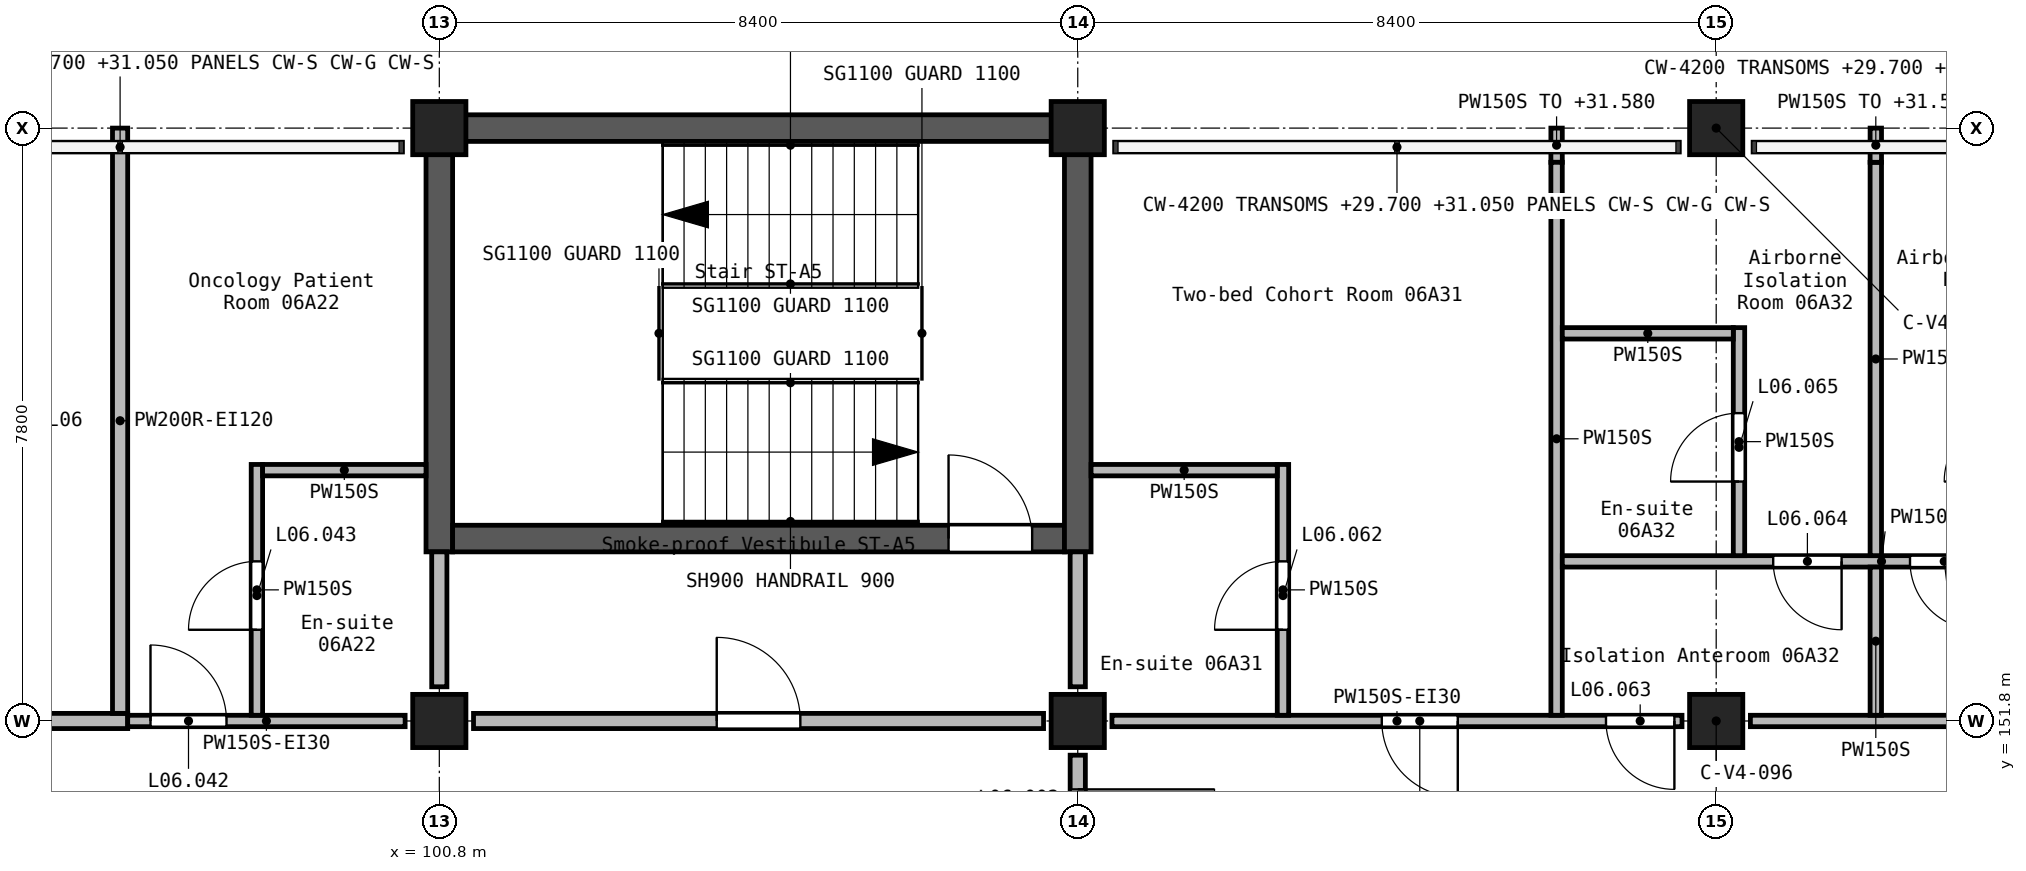
"""IFC4 building model, lengths in metres.
Left out: names, types, materials, properties, quantities, classifications, styles, units other than length and angle.
Written with IfcOpenShell. Run it as: python <this file> out.ifc"""

import sys

from ifc_helpers import new_model, si_unit, direction, frame, frame_2d, origin, origin_2d, place, context, subcontext, project, spatial, rectangle, extrude, element, fill, save


model = new_model("IFC4")
c1 = context("Model", 3, precision=1e-05, world=origin(), true_north=direction((0.0, 1.0)))
c2 = subcontext(c1, "Body", "Model", "MODEL_VIEW")
j1 = project(units=[si_unit("LENGTHUNIT", "METRE"), si_unit("PLANEANGLEUNIT", "RADIAN")], contexts=[c1])
p1 = place(None, origin())
s1 = spatial("IfcSite", under=j1, at=p1, CompositionType="ELEMENT")
p2 = place(p1, origin())
s2 = spatial("IfcBuilding", under=s1, at=p2, CompositionType="ELEMENT")
p3 = place(p2, frame((0.0, 0.0, 28.8)))
s3 = spatial("IfcBuildingStorey", under=s2, at=p3, CompositionType="ELEMENT", Elevation=28.8)
for number, where, z_axis, x_axis in (
    (1, (100.8, 151.8, 0.0), (0.0, 0.0, 1.0), (1.0, 0.0, 0.0)),
    (2, (100.8, 159.6, 0.0), (0.0, 0.0, 1.0), (1.0, 0.0, 0.0)),
    (3, (109.2, 151.8, 0.0), (0.0, 0.0, 1.0), (1.0, 0.0, 0.0)),
    (4, (109.2, 159.6, 0.0), (0.0, 0.0, 1.0), (1.0, 0.0, 0.0)),
    (5, (117.6, 151.8, 0.0), (0.0, 0.0, 1.0), (1.0, 0.0, 0.0)),
    (6, (117.6, 159.6, 0.0), (0.0, 0.0, 1.0), (1.0, 0.0, 0.0)),
):
    element("IfcColumn", number, at=place(p3, frame(where, z_axis=z_axis, x_axis=x_axis)), inside=s3, PredefinedType="COLUMN", context=c2, shape_type="SweptSolid", body=[
        extrude(rectangle(XDim=0.7, YDim=0.7, at=origin_2d()), origin(), (0.0, 0.0, 1.0), 3.9),
    ])
p4 = place(p3, frame((100.625, 159.6, 0.0), z_axis=(0.0, 0.0, 1.0), x_axis=(1.0, 0.0, 0.0)))
e7 = element("IfcWall", 7, at=p4, inside=s3, PredefinedType="SHEAR", context=c2, shape_type="SweptSolid", body=[
    extrude(rectangle(XDim=8.4, YDim=0.35, at=frame_2d((4.2, 0.0))), origin(), (0.0, 0.0, 1.0), 3.9),
])
p5 = place(p3, frame((100.8, 154.025, 0.0), z_axis=(0.0, 0.0, 1.0), x_axis=(0.0, 1.0, 0.0)))
e8 = element("IfcWall", 8, at=p5, inside=s3, PredefinedType="SHEAR", context=c2, shape_type="SweptSolid", body=[
    extrude(rectangle(XDim=5.4, YDim=0.35, at=frame_2d((2.7, 0.0))), origin(), (0.0, 0.0, 1.0), 3.9),
])
p6 = place(p3, frame((100.975, 154.2, 0.0), z_axis=(0.0, 0.0, 1.0), x_axis=(1.0, 0.0, 0.0)))
e9 = element("IfcWall", 9, at=p6, inside=s3, PredefinedType="SHEAR", context=c2, shape_type="SweptSolid", body=[
    extrude(rectangle(XDim=8.05, YDim=0.35, at=frame_2d((4.025, 0.0))), origin(), (0.0, 0.0, 1.0), 3.9),
])
p7 = place(p6, frame((6.525, 0.0, 0.0)))
e10 = element("IfcOpeningElement", 10, at=p7, cuts=e9, PredefinedType="OPENING", context=c2, shape_type="SweptSolid", body=[
    extrude(rectangle(XDim=1.1, YDim=2.1, at=frame_2d((0.55, 1.05))), frame((0.0, 0.185, 0.0), z_axis=(0.0, -1.0, 0.0), x_axis=(1.0, 0.0, 0.0)), (0.0, 0.0, 1.0), 0.37),
])
p8 = place(p3, frame((109.2, 154.025, 0.0), z_axis=(0.0, 0.0, 1.0), x_axis=(0.0, 1.0, 0.0)))
e11 = element("IfcWall", 11, at=p8, inside=s3, PredefinedType="SHEAR", context=c2, shape_type="SweptSolid", body=[
    extrude(rectangle(XDim=5.75, YDim=0.35, at=frame_2d((2.875, 0.0))), origin(), (0.0, 0.0, 1.0), 3.9),
])
p9 = place(p3, frame((109.2, 154.025, 0.0), z_axis=(0.0, 0.0, 1.0), x_axis=(0.0, -1.0, 0.0)))
e12 = element("IfcWall", 12, at=p9, inside=s3, PredefinedType="SOLIDWALL", context=c2, shape_type="SweptSolid", body=[
    extrude(rectangle(XDim=1.775, YDim=0.2, at=frame_2d((0.887, 0.0))), origin(), (0.0, 0.0, 1.0), 3.6),
])
p10 = place(p3, frame((109.2, 151.35, 0.0), z_axis=(0.0, 0.0, 1.0), x_axis=(0.0, -1.0, 0.0)))
e13 = element("IfcWall", 13, at=p10, inside=s3, PredefinedType="SOLIDWALL", context=c2, shape_type="SweptSolid", body=[
    extrude(rectangle(XDim=2.7, YDim=0.2, at=frame_2d((1.35, 0.0))), origin(), (0.0, 0.0, 1.0), 3.6),
])
p11 = place(p10, frame((0.45, 0.0, 0.0)))
e14 = element("IfcOpeningElement", 14, at=p11, cuts=e13, PredefinedType="OPENING", context=c2, shape_type="SweptSolid", body=[
    extrude(rectangle(XDim=1.8, YDim=2.1, at=frame_2d((0.9, 1.05))), frame((0.0, 0.11, 0.0), z_axis=(0.0, -1.0, 0.0), x_axis=(1.0, 0.0, 0.0)), (0.0, 0.0, 1.0), 0.22),
])
p12 = place(p3, frame((92.85, 151.8, 0.0), z_axis=(0.0, 0.0, 1.0), x_axis=(1.0, 0.0, 0.0)))
e15 = element("IfcWall", 15, at=p12, inside=s3, PredefinedType="SOLIDWALL", context=c2, shape_type="SweptSolid", body=[
    extrude(rectangle(XDim=3.85, YDim=0.2, at=frame_2d((1.925, 0.0))), origin(), (0.0, 0.0, 1.0), 3.6),
])
p13 = place(p12, frame((1.15, 0.0, 0.0)))
e16 = element("IfcOpeningElement", 16, at=p13, cuts=e15, PredefinedType="OPENING", context=c2, shape_type="SweptSolid", body=[
    extrude(rectangle(XDim=1.0, YDim=2.1, at=frame_2d((0.5, 1.05))), frame((0.0, 0.11, 0.0), z_axis=(0.0, -1.0, 0.0), x_axis=(1.0, 0.0, 0.0)), (0.0, 0.0, 1.0), 0.22),
])
p14 = place(p3, frame((101.25, 151.8, 0.0), z_axis=(0.0, 0.0, 1.0), x_axis=(1.0, 0.0, 0.0)))
e17 = element("IfcWall", 17, at=p14, inside=s3, PredefinedType="SOLIDWALL", context=c2, shape_type="SweptSolid", body=[
    extrude(rectangle(XDim=7.5, YDim=0.2, at=frame_2d((3.75, 0.0))), origin(), (0.0, 0.0, 1.0), 3.6),
])
p15 = place(p14, frame((3.2, 0.0, 0.0)))
e18 = element("IfcOpeningElement", 18, at=p15, cuts=e17, PredefinedType="OPENING", context=c2, shape_type="SweptSolid", body=[
    extrude(rectangle(XDim=1.1, YDim=2.1, at=frame_2d((0.55, 1.05))), frame((0.0, 0.11, 0.0), z_axis=(0.0, -1.0, 0.0), x_axis=(1.0, 0.0, 0.0)), (0.0, 0.0, 1.0), 0.22),
])
p16 = place(p3, frame((96.6, 151.9, 0.0), z_axis=(0.0, 0.0, 1.0), x_axis=(0.0, 1.0, 0.0)))
e19 = element("IfcWall", 19, at=p16, inside=s3, PredefinedType="SOLIDWALL", context=c2, shape_type="SweptSolid", body=[
    extrude(rectangle(XDim=7.7, YDim=0.2, at=frame_2d((3.85, 0.0))), origin(), (0.0, 0.0, 1.0), 3.6),
])
p17 = place(p3, frame((100.8, 152.25, 0.0), z_axis=(0.0, 0.0, 1.0), x_axis=(0.0, 1.0, 0.0)))
e20 = element("IfcWall", 20, at=p17, inside=s3, PredefinedType="SOLIDWALL", context=c2, shape_type="SweptSolid", body=[
    extrude(rectangle(XDim=1.775, YDim=0.2, at=frame_2d((0.887, 0.0))), origin(), (0.0, 0.0, 1.0), 3.6),
])
p18 = place(p3, frame((125.55, 151.8, 0.0), z_axis=(0.0, 0.0, 1.0), x_axis=(-1.0, 0.0, 0.0)))
e21 = element("IfcWall", 21, at=p18, inside=s3, PredefinedType="PARTITIONING", context=c2, shape_type="SweptSolid", body=[
    extrude(rectangle(XDim=7.5, YDim=0.15, at=frame_2d((3.75, 0.0))), origin(), (0.0, 0.0, 1.0), 3.6),
])
p19 = place(p18, frame((3.3, 0.0, 0.0)))
e22 = element("IfcOpeningElement", 22, at=p19, cuts=e21, PredefinedType="OPENING", context=c2, shape_type="SweptSolid", body=[
    extrude(rectangle(XDim=0.9, YDim=2.1, at=frame_2d((0.45, 1.05))), frame((0.0, 0.085, 0.0), z_axis=(0.0, -1.0, 0.0), x_axis=(1.0, 0.0, 0.0)), (0.0, 0.0, 1.0), 0.17),
])
p20 = place(p3, frame((117.15, 151.8, 0.0), z_axis=(0.0, 0.0, 1.0), x_axis=(-1.0, 0.0, 0.0)))
e23 = element("IfcWall", 23, at=p20, inside=s3, PredefinedType="PARTITIONING", context=c2, shape_type="SweptSolid", body=[
    extrude(rectangle(XDim=7.5, YDim=0.15, at=frame_2d((3.75, 0.0))), origin(), (0.0, 0.0, 1.0), 3.6),
])
p21 = place(p20, frame((2.95, 0.0, 0.0)))
e24 = element("IfcOpeningElement", 24, at=p21, cuts=e23, PredefinedType="OPENING", context=c2, shape_type="SweptSolid", body=[
    extrude(rectangle(XDim=1.0, YDim=2.1, at=frame_2d((0.5, 1.05))), frame((0.0, 0.085, 0.0), z_axis=(0.0, -1.0, 0.0), x_axis=(1.0, 0.0, 0.0)), (0.0, 0.0, 1.0), 0.17),
])
p22 = place(p20, frame((0.1, 0.0, 0.0)))
e25 = element("IfcOpeningElement", 25, at=p22, cuts=e23, PredefinedType="OPENING", context=c2, shape_type="SweptSolid", body=[
    extrude(rectangle(XDim=0.9, YDim=2.1, at=frame_2d((0.45, 1.05))), frame((0.0, 0.085, 0.0), z_axis=(0.0, -1.0, 0.0), x_axis=(1.0, 0.0, 0.0)), (0.0, 0.0, 1.0), 0.17),
])
p23 = place(p3, frame((96.7, 151.8, 0.0), z_axis=(0.0, 0.0, 1.0), x_axis=(1.0, 0.0, 0.0)))
e26 = element("IfcWall", 26, at=p23, inside=s3, PredefinedType="PARTITIONING", context=c2, shape_type="SweptSolid", body=[
    extrude(rectangle(XDim=3.65, YDim=0.15, at=frame_2d((1.825, 0.0))), origin(), (0.0, 0.0, 1.0), 3.6),
])
p24 = place(p23, frame((0.3, 0.0, 0.0)))
e27 = element("IfcOpeningElement", 27, at=p24, cuts=e26, PredefinedType="OPENING", context=c2, shape_type="SweptSolid", body=[
    extrude(rectangle(XDim=1.0, YDim=2.1, at=frame_2d((0.5, 1.05))), frame((0.0, 0.085, 0.0), z_axis=(0.0, -1.0, 0.0), x_axis=(1.0, 0.0, 0.0)), (0.0, 0.0, 1.0), 0.17),
])
p25 = place(p3, frame((115.5, 159.6, 0.0), z_axis=(0.0, 0.0, 1.0), x_axis=(0.0, -1.0, 0.0)))
e28 = element("IfcWall", 28, at=p25, inside=s3, PredefinedType="PARTITIONING", context=c2, shape_type="SweptSolid", body=[
    extrude(rectangle(XDim=0.45, YDim=0.15, at=frame_2d((0.225, 0.0))), origin(), (0.0, 0.0, 1.0), 2.78),
])
p26 = place(p3, frame((115.5, 159.15, 0.0), z_axis=(0.0, 0.0, 1.0), x_axis=(0.0, -1.0, 0.0)))
e29 = element("IfcWall", 29, at=p26, inside=s3, PredefinedType="PARTITIONING", context=c2, shape_type="SweptSolid", body=[
    extrude(rectangle(XDim=7.275, YDim=0.15, at=frame_2d((3.637, 0.0))), origin(), (0.0, 0.0, 1.0), 3.6),
])
p27 = place(p3, frame((123.975, 153.9, 0.0), z_axis=(0.0, 0.0, 1.0), x_axis=(-1.0, 0.0, 0.0)))
e30 = element("IfcWall", 30, at=p27, inside=s3, PredefinedType="PARTITIONING", context=c2, shape_type="SweptSolid", body=[
    extrude(rectangle(XDim=8.4, YDim=0.15, at=frame_2d((4.2, 0.0))), origin(), (0.0, 0.0, 1.0), 3.6),
])
p28 = place(p27, frame((4.725, 0.0, 0.0)))
e31 = element("IfcOpeningElement", 31, at=p28, cuts=e30, PredefinedType="OPENING", context=c2, shape_type="SweptSolid", body=[
    extrude(rectangle(XDim=0.9, YDim=2.1, at=frame_2d((0.45, 1.05))), frame((0.0, 0.085, 0.0), z_axis=(0.0, -1.0, 0.0), x_axis=(1.0, 0.0, 0.0)), (0.0, 0.0, 1.0), 0.17),
])
p29 = place(p27, frame((2.925, 0.0, 0.0)))
e32 = element("IfcOpeningElement", 32, at=p29, cuts=e30, PredefinedType="OPENING", context=c2, shape_type="SweptSolid", body=[
    extrude(rectangle(XDim=0.9, YDim=2.1, at=frame_2d((0.45, 1.05))), frame((0.0, 0.085, 0.0), z_axis=(0.0, -1.0, 0.0), x_axis=(1.0, 0.0, 0.0)), (0.0, 0.0, 1.0), 0.17),
])
p30 = place(p3, frame((119.7, 151.875, 0.0), z_axis=(0.0, 0.0, 1.0), x_axis=(0.0, 1.0, 0.0)))
e33 = element("IfcWall", 33, at=p30, inside=s3, PredefinedType="PARTITIONING", context=c2, shape_type="SweptSolid", body=[
    extrude(rectangle(XDim=1.95, YDim=0.15, at=frame_2d((0.975, 0.0))), origin(), (0.0, 0.0, 1.0), 3.6),
])
p31 = place(p3, frame((119.7, 153.975, 0.0), z_axis=(0.0, 0.0, 1.0), x_axis=(0.0, 1.0, 0.0)))
e34 = element("IfcWall", 34, at=p31, inside=s3, PredefinedType="PARTITIONING", context=c2, shape_type="SweptSolid", body=[
    extrude(rectangle(XDim=5.175, YDim=0.15, at=frame_2d((2.587, 0.0))), origin(), (0.0, 0.0, 1.0), 3.6),
])
p32 = place(p3, frame((119.7, 159.15, 0.0), z_axis=(0.0, 0.0, 1.0), x_axis=(0.0, 1.0, 0.0)))
e35 = element("IfcWall", 35, at=p32, inside=s3, PredefinedType="PARTITIONING", context=c2, shape_type="SweptSolid", body=[
    extrude(rectangle(XDim=0.45, YDim=0.15, at=frame_2d((0.225, 0.0))), origin(), (0.0, 0.0, 1.0), 2.78),
])
p33 = place(p3, frame((98.4, 151.875, 0.0), z_axis=(0.0, 0.0, 1.0), x_axis=(0.0, 1.0, 0.0)))
e36 = element("IfcWall", 36, at=p33, inside=s3, PredefinedType="PARTITIONING", context=c2, shape_type="SweptSolid", body=[
    extrude(rectangle(XDim=3.3, YDim=0.15, at=frame_2d((1.65, 0.0))), origin(), (0.0, 0.0, 1.0), 3.6),
])
p34 = place(p33, frame((1.125, 0.0, 0.0)))
e37 = element("IfcOpeningElement", 37, at=p34, cuts=e36, PredefinedType="OPENING", context=c2, shape_type="SweptSolid", body=[
    extrude(rectangle(XDim=0.9, YDim=2.1, at=frame_2d((0.45, 1.05))), frame((0.0, 0.085, 0.0), z_axis=(0.0, -1.0, 0.0), x_axis=(1.0, 0.0, 0.0)), (0.0, 0.0, 1.0), 0.17),
])
p35 = place(p3, frame((111.9, 151.875, 0.0), z_axis=(0.0, 0.0, 1.0), x_axis=(0.0, 1.0, 0.0)))
e38 = element("IfcWall", 38, at=p35, inside=s3, PredefinedType="PARTITIONING", context=c2, shape_type="SweptSolid", body=[
    extrude(rectangle(XDim=3.3, YDim=0.15, at=frame_2d((1.65, 0.0))), origin(), (0.0, 0.0, 1.0), 3.6),
])
p36 = place(p35, frame((1.125, 0.0, 0.0)))
e39 = element("IfcOpeningElement", 39, at=p36, cuts=e38, PredefinedType="OPENING", context=c2, shape_type="SweptSolid", body=[
    extrude(rectangle(XDim=0.9, YDim=2.1, at=frame_2d((0.45, 1.05))), frame((0.0, 0.085, 0.0), z_axis=(0.0, -1.0, 0.0), x_axis=(1.0, 0.0, 0.0)), (0.0, 0.0, 1.0), 0.17),
])
p37 = place(p3, frame((117.9, 153.975, 0.0), z_axis=(0.0, 0.0, 1.0), x_axis=(0.0, 1.0, 0.0)))
e40 = element("IfcWall", 40, at=p37, inside=s3, PredefinedType="PARTITIONING", context=c2, shape_type="SweptSolid", body=[
    extrude(rectangle(XDim=3.0, YDim=0.15, at=frame_2d((1.5, 0.0))), origin(), (0.0, 0.0, 1.0), 3.6),
])
p38 = place(p37, frame((0.975, 0.0, 0.0)))
e41 = element("IfcOpeningElement", 41, at=p38, cuts=e40, PredefinedType="OPENING", context=c2, shape_type="SweptSolid", body=[
    extrude(rectangle(XDim=0.9, YDim=2.1, at=frame_2d((0.45, 1.05))), frame((0.0, 0.085, 0.0), z_axis=(0.0, -1.0, 0.0), x_axis=(1.0, 0.0, 0.0)), (0.0, 0.0, 1.0), 0.17),
])
p39 = place(p3, frame((109.375, 155.1, 0.0), z_axis=(0.0, 0.0, 1.0), x_axis=(1.0, 0.0, 0.0)))
e42 = element("IfcWall", 42, at=p39, inside=s3, PredefinedType="PARTITIONING", context=c2, shape_type="SweptSolid", body=[
    extrude(rectangle(XDim=2.45, YDim=0.15, at=frame_2d((1.225, 0.0))), origin(), (0.0, 0.0, 1.0), 3.6),
])
p40 = place(p3, frame((115.575, 156.9, 0.0), z_axis=(0.0, 0.0, 1.0), x_axis=(1.0, 0.0, 0.0)))
e43 = element("IfcWall", 43, at=p40, inside=s3, PredefinedType="PARTITIONING", context=c2, shape_type="SweptSolid", body=[
    extrude(rectangle(XDim=2.25, YDim=0.15, at=frame_2d((1.125, 0.0))), origin(), (0.0, 0.0, 1.0), 3.6),
])
p41 = place(p3, frame((98.475, 155.1, 0.0), z_axis=(0.0, 0.0, 1.0), x_axis=(1.0, 0.0, 0.0)))
e44 = element("IfcWall", 44, at=p41, inside=s3, PredefinedType="PARTITIONING", context=c2, shape_type="SweptSolid", body=[
    extrude(rectangle(XDim=2.15, YDim=0.15, at=frame_2d((1.075, 0.0))), origin(), (0.0, 0.0, 1.0), 3.6),
])
p42 = place(p11, origin())
e45 = element("IfcDoor", 45, at=p42, inside=s3, OperationType="DOUBLE_DOOR_SINGLE_SWING", PredefinedType="DOOR", context=c2, shape_type="SweptSolid", body=[
    extrude(rectangle(XDim=1.8, YDim=2.1, at=frame_2d((0.9, 1.05))), frame((0.0, 0.025, 0.0), z_axis=(0.0, -1.0, 0.0), x_axis=(1.0, 0.0, 0.0)), (0.0, 0.0, 1.0), 0.05),
])
fill(e14, e45)
p43 = place(p24, origin())
e46 = element("IfcDoor", 46, at=p43, inside=s3, OperationType="SINGLE_SWING_LEFT", PredefinedType="DOOR", context=c2, shape_type="SweptSolid", body=[
    extrude(rectangle(XDim=1.0, YDim=2.1, at=frame_2d((0.5, 1.05))), frame((0.0, 0.025, 0.0), z_axis=(0.0, -1.0, 0.0), x_axis=(1.0, 0.0, 0.0)), (0.0, 0.0, 1.0), 0.05),
])
fill(e27, e46)
p44 = place(p34, frame((0.9, 0.0, 0.0), z_axis=(0.0, 0.0, 1.0), x_axis=(-1.0, 0.0, 0.0)))
e47 = element("IfcDoor", 47, at=p44, inside=s3, OperationType="SINGLE_SWING_RIGHT", PredefinedType="DOOR", context=c2, shape_type="SweptSolid", body=[
    extrude(rectangle(XDim=0.9, YDim=2.1, at=frame_2d((0.45, 1.05))), frame((0.0, 0.025, 0.0), z_axis=(0.0, -1.0, 0.0), x_axis=(1.0, 0.0, 0.0)), (0.0, 0.0, 1.0), 0.05),
])
fill(e37, e47)
p45 = place(p21, frame((1.0, 0.0, 0.0), z_axis=(0.0, 0.0, 1.0), x_axis=(-1.0, 0.0, 0.0)))
e48 = element("IfcDoor", 48, at=p45, inside=s3, OperationType="SINGLE_SWING_RIGHT", PredefinedType="DOOR", context=c2, shape_type="SweptSolid", body=[
    extrude(rectangle(XDim=1.0, YDim=2.1, at=frame_2d((0.5, 1.05))), frame((0.0, 0.025, 0.0), z_axis=(0.0, -1.0, 0.0), x_axis=(1.0, 0.0, 0.0)), (0.0, 0.0, 1.0), 0.05),
])
fill(e24, e48)
p46 = place(p36, origin())
e49 = element("IfcDoor", 49, at=p46, inside=s3, OperationType="SINGLE_SWING_LEFT", PredefinedType="DOOR", context=c2, shape_type="SweptSolid", body=[
    extrude(rectangle(XDim=0.9, YDim=2.1, at=frame_2d((0.45, 1.05))), frame((0.0, 0.025, 0.0), z_axis=(0.0, -1.0, 0.0), x_axis=(1.0, 0.0, 0.0)), (0.0, 0.0, 1.0), 0.05),
])
fill(e39, e49)
p47 = place(p22, frame((0.9, 0.0, 0.0), z_axis=(0.0, 0.0, 1.0), x_axis=(-1.0, 0.0, 0.0)))
e50 = element("IfcDoor", 50, at=p47, inside=s3, OperationType="SINGLE_SWING_RIGHT", PredefinedType="DOOR", context=c2, shape_type="SweptSolid", body=[
    extrude(rectangle(XDim=0.9, YDim=2.1, at=frame_2d((0.45, 1.05))), frame((0.0, 0.025, 0.0), z_axis=(0.0, -1.0, 0.0), x_axis=(1.0, 0.0, 0.0)), (0.0, 0.0, 1.0), 0.05),
])
fill(e25, e50)
p48 = place(p28, frame((0.9, 0.0, 0.0), z_axis=(0.0, 0.0, 1.0), x_axis=(-1.0, 0.0, 0.0)))
e51 = element("IfcDoor", 51, at=p48, inside=s3, OperationType="SINGLE_SWING_LEFT", PredefinedType="DOOR", context=c2, shape_type="SweptSolid", body=[
    extrude(rectangle(XDim=0.9, YDim=2.1, at=frame_2d((0.45, 1.05))), frame((0.0, 0.025, 0.0), z_axis=(0.0, -1.0, 0.0), x_axis=(1.0, 0.0, 0.0)), (0.0, 0.0, 1.0), 0.05),
])
fill(e31, e51)
p49 = place(p38, origin())
e52 = element("IfcDoor", 52, at=p49, inside=s3, OperationType="SINGLE_SWING_LEFT", PredefinedType="DOOR", context=c2, shape_type="SweptSolid", body=[
    extrude(rectangle(XDim=0.9, YDim=2.1, at=frame_2d((0.45, 1.05))), frame((0.0, 0.025, 0.0), z_axis=(0.0, -1.0, 0.0), x_axis=(1.0, 0.0, 0.0)), (0.0, 0.0, 1.0), 0.05),
])
fill(e41, e52)
p50 = place(p29, frame((0.9, 0.0, 0.0), z_axis=(0.0, 0.0, 1.0), x_axis=(-1.0, 0.0, 0.0)))
e53 = element("IfcDoor", 53, at=p50, inside=s3, OperationType="SINGLE_SWING_RIGHT", PredefinedType="DOOR", context=c2, shape_type="SweptSolid", body=[
    extrude(rectangle(XDim=0.9, YDim=2.1, at=frame_2d((0.45, 1.05))), frame((0.0, 0.025, 0.0), z_axis=(0.0, -1.0, 0.0), x_axis=(1.0, 0.0, 0.0)), (0.0, 0.0, 1.0), 0.05),
])
fill(e32, e53)
p51 = place(p7, origin())
e54 = element("IfcDoor", 54, at=p51, inside=s3, OperationType="SINGLE_SWING_RIGHT", PredefinedType="DOOR", context=c2, shape_type="SweptSolid", body=[
    extrude(rectangle(XDim=1.1, YDim=2.1, at=frame_2d((0.55, 1.05))), frame((0.0, 0.025, 0.0), z_axis=(0.0, -1.0, 0.0), x_axis=(1.0, 0.0, 0.0)), (0.0, 0.0, 1.0), 0.05),
])
fill(e10, e54)
p52 = place(p15, origin())
e55 = element("IfcDoor", 55, at=p52, inside=s3, OperationType="SINGLE_SWING_RIGHT", PredefinedType="DOOR", context=c2, shape_type="SweptSolid", body=[
    extrude(rectangle(XDim=1.1, YDim=2.1, at=frame_2d((0.55, 1.05))), frame((0.0, 0.025, 0.0), z_axis=(0.0, -1.0, 0.0), x_axis=(1.0, 0.0, 0.0)), (0.0, 0.0, 1.0), 0.05),
])
fill(e18, e55)
save(model, sys.argv[1])
